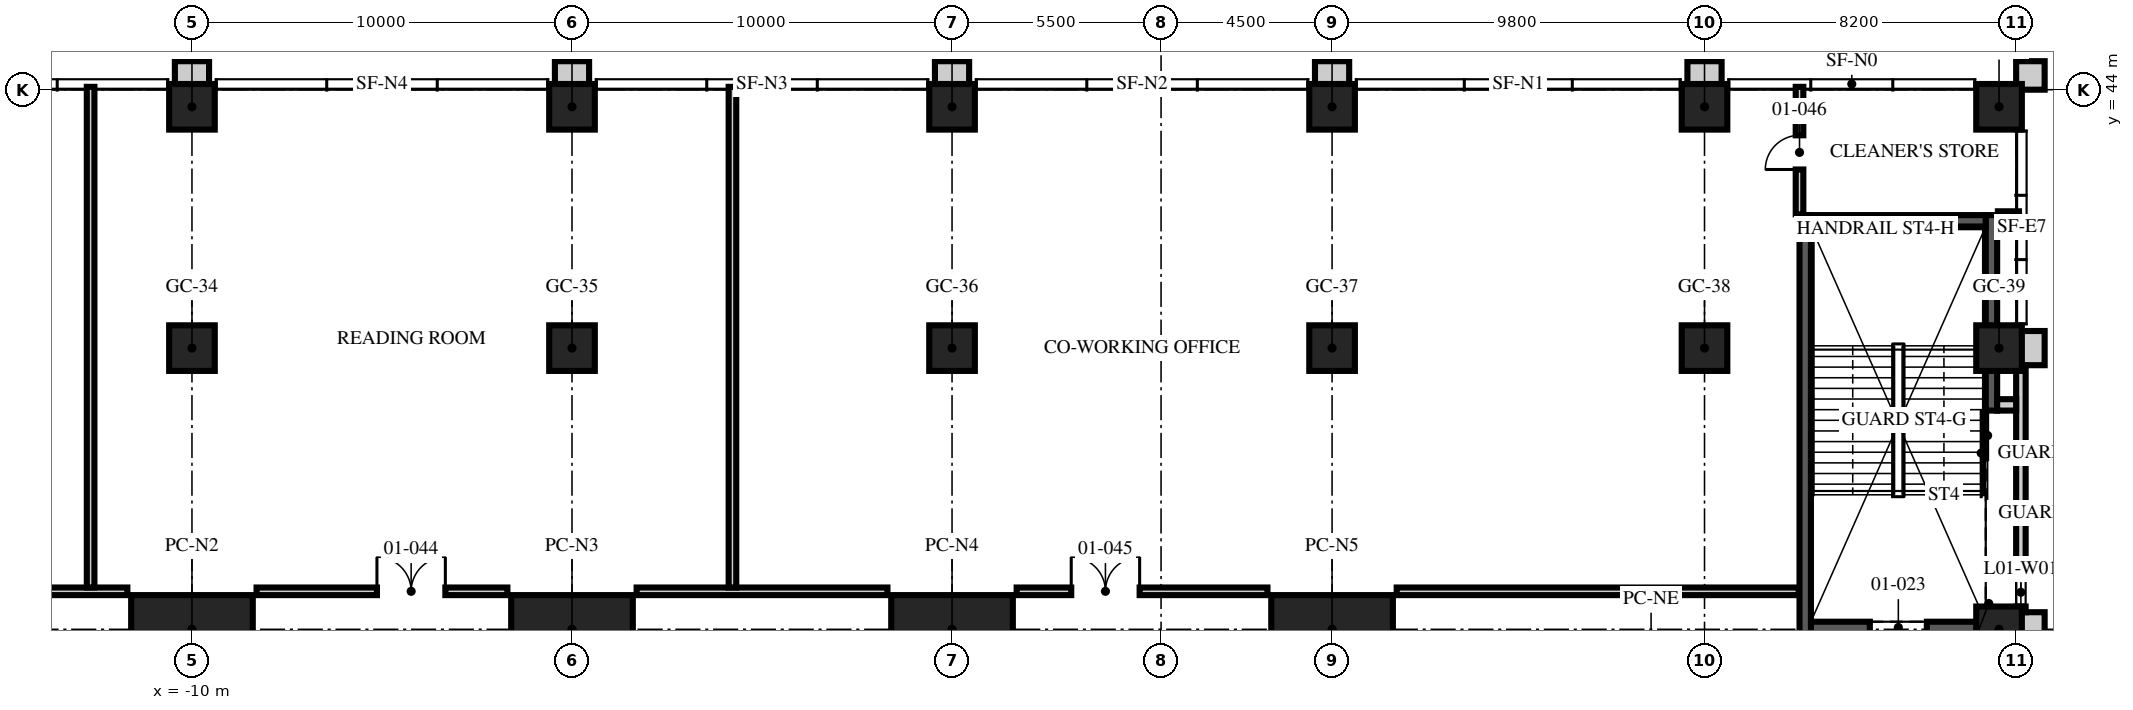
"""IFC4 building model, lengths in metres.
Left out: names, types, materials, properties, quantities, classifications, styles, units other than length and angle.
Written with IfcOpenShell. Run it as: python <this file> out.ifc"""

import sys

from ifc_helpers import new_model, si_unit, direction, frame, frame_2d, origin, origin_2d, place, context, subcontext, project, spatial, rectangle, hollow_rectangle, extrude, element, fill, save


model = new_model("IFC4")
c1 = context("Model", 3, precision=1e-05, world=origin(), true_north=direction((0.0, 1.0)))
c2 = subcontext(c1, "Body", "Model", "MODEL_VIEW")
j1 = project(units=[si_unit("LENGTHUNIT", "METRE"), si_unit("PLANEANGLEUNIT", "RADIAN")], contexts=[c1])
p1 = place(None, origin())
s1 = spatial("IfcSite", under=j1, at=p1, CompositionType="ELEMENT")
p2 = place(p1, origin())
s2 = spatial("IfcBuilding", under=s1, at=p2, CompositionType="ELEMENT")
p3 = place(p2, frame((0.0, 0.0, 6.0)))
s3 = spatial("IfcBuildingStorey", under=s2, at=p3, CompositionType="ELEMENT", Elevation=6.0)
for number, where, z_axis, x_axis in (
    (1, (-10.0, 29.8, 0.0), (0.0, 0.0, 1.0), (1.0, 0.0, 0.0)),
    (2, (0.0, 29.8, 0.0), (0.0, 0.0, 1.0), (1.0, 0.0, 0.0)),
    (3, (10.0, 29.8, 0.0), (0.0, 0.0, 1.0), (1.0, 0.0, 0.0)),
    (4, (20.0, 29.8, 0.0), (0.0, 0.0, 1.0), (1.0, 0.0, 0.0)),
):
    element("IfcColumn", number, at=place(p3, frame(where, z_axis=z_axis, x_axis=x_axis)), inside=s3, PredefinedType="COLUMN", context=c2, shape_type="SweptSolid", body=[
        extrude(hollow_rectangle(XDim=3.2, YDim=1.8, WallThickness=0.2, at=origin_2d()), origin(), (0.0, 0.0, 1.0), 5.0),
    ])
for number, where, z_axis, x_axis in (
    (5, (37.55, 29.8, 0.0), (0.0, 0.0, 1.0), (1.0, 0.0, 0.0)),
    (6, (-10.0, 37.2, 0.0), (0.0, 0.0, 1.0), (1.0, 0.0, 0.0)),
    (7, (0.0, 37.2, 0.0), (0.0, 0.0, 1.0), (1.0, 0.0, 0.0)),
    (8, (10.0, 37.2, 0.0), (0.0, 0.0, 1.0), (1.0, 0.0, 0.0)),
    (9, (20.0, 37.2, 0.0), (0.0, 0.0, 1.0), (1.0, 0.0, 0.0)),
    (10, (29.8, 37.2, 0.0), (0.0, 0.0, 1.0), (1.0, 0.0, 0.0)),
    (11, (37.55, 37.2, 0.0), (0.0, 0.0, 1.0), (1.0, 0.0, 0.0)),
    (12, (-10.0, 43.55, 0.0), (0.0, 0.0, 1.0), (1.0, 0.0, 0.0)),
    (13, (0.0, 43.55, 0.0), (0.0, 0.0, 1.0), (1.0, 0.0, 0.0)),
    (14, (10.0, 43.55, 0.0), (0.0, 0.0, 1.0), (1.0, 0.0, 0.0)),
    (15, (20.0, 43.55, 0.0), (0.0, 0.0, 1.0), (1.0, 0.0, 0.0)),
    (16, (29.8, 43.55, 0.0), (0.0, 0.0, 1.0), (1.0, 0.0, 0.0)),
    (17, (37.55, 43.55, 0.0), (0.0, 0.0, 1.0), (1.0, 0.0, 0.0)),
):
    element("IfcColumn", number, at=place(p3, frame(where, z_axis=z_axis, x_axis=x_axis)), inside=s3, PredefinedType="COLUMN", context=c2, shape_type="SweptSolid", body=[
        extrude(rectangle(XDim=1.2, YDim=1.2, at=origin_2d()), origin(), (0.0, 0.0, 1.0), 5.0),
    ])
for number, where, z_axis, x_axis in (
    (18, (38.375, 29.35, 0.0), (0.0, 0.0, 1.0), (0.0, 1.0, 0.0)),
    (19, (38.375, 36.75, 0.0), (0.0, 0.0, 1.0), (0.0, 1.0, 0.0)),
):
    element("IfcWall", number, at=place(p3, frame(where, z_axis=z_axis, x_axis=x_axis)), inside=s3, PredefinedType="SOLIDWALL", context=c2, shape_type="SweptSolid", body=[
        extrude(rectangle(XDim=0.9, YDim=0.75, at=frame_2d((0.45, 0.0))), origin(), (0.0, 0.0, 1.0), 5.0),
    ])
p4 = place(p3, frame((38.375, 44.0, 0.0), z_axis=(0.0, 0.0, 1.0), x_axis=(0.0, 1.0, 0.0)))
e20 = element("IfcWall", 20, at=p4, inside=s3, PredefinedType="SOLIDWALL", context=c2, shape_type="SweptSolid", body=[
    extrude(rectangle(XDim=0.75, YDim=0.75, at=frame_2d((0.375, 0.0))), origin(), (0.0, 0.0, 1.0), 5.0),
])
p5 = place(p3, frame((38.125, 30.25, 0.0), z_axis=(0.0, 0.0, 1.0), x_axis=(0.0, 1.0, 0.0)))
e21 = element("IfcWall", 21, at=p5, inside=s3, PredefinedType="SOLIDWALL", context=c2, shape_type="SweptSolid", body=[
    extrude(rectangle(XDim=6.5, YDim=0.25, at=frame_2d((3.25, 0.0))), origin(), (0.0, 0.0, 1.0), 5.0),
])
p6 = place(p5, frame((0.15, 0.0, 1.2)))
e22 = element("IfcOpeningElement", 22, at=p6, cuts=e21, PredefinedType="OPENING", context=c2, shape_type="SweptSolid", body=[
    extrude(rectangle(XDim=0.75, YDim=1.7, at=frame_2d((0.375, 0.85))), frame((0.0, 0.135, 0.0), z_axis=(0.0, -1.0, 0.0), x_axis=(1.0, 0.0, 0.0)), (0.0, 0.0, 1.0), 0.27),
])
for number, where, z_axis, x_axis in (
    (23, (30.25, 44.375, 0.0), (0.0, 0.0, 1.0), (-1.0, 0.0, 0.0)),
    (24, (20.45, 44.375, 0.0), (0.0, 0.0, 1.0), (-1.0, 0.0, 0.0)),
    (25, (10.45, 44.375, 0.0), (0.0, 0.0, 1.0), (-1.0, 0.0, 0.0)),
    (26, (0.45, 44.375, 0.0), (0.0, 0.0, 1.0), (-1.0, 0.0, 0.0)),
    (27, (-9.55, 44.375, 0.0), (0.0, 0.0, 1.0), (-1.0, 0.0, 0.0)),
):
    element("IfcWall", number, at=place(p3, frame(where, z_axis=z_axis, x_axis=x_axis)), inside=s3, PredefinedType="SOLIDWALL", context=c2, shape_type="SweptSolid", body=[
        extrude(rectangle(XDim=0.9, YDim=0.75, at=frame_2d((0.45, 0.0))), origin(), (0.0, 0.0, 1.0), 5.0),
    ])
p7 = place(p3, frame((37.35, 35.556, 0.0), z_axis=(0.0, 0.0, 1.0), x_axis=(0.0, 1.0, 0.0)))
e28 = element("IfcWall", 28, at=p7, inside=s3, PredefinedType="SOLIDWALL", context=c2, shape_type="SweptSolid", body=[
    extrude(rectangle(XDim=5.144, YDim=0.3, at=frame_2d((2.572, 0.0))), origin(), (0.0, 0.0, 1.0), 4.7),
])
p8 = place(p3, frame((38.0, 35.706, 0.0), z_axis=(0.0, 0.0, 1.0), x_axis=(-1.0, 0.0, 0.0)))
e29 = element("IfcWall", 29, at=p8, inside=s3, PredefinedType="PARTITIONING", context=c2, shape_type="SweptSolid", body=[
    extrude(rectangle(XDim=0.5, YDim=0.3, at=frame_2d((0.25, 0.0))), origin(), (0.0, 0.0, 1.0), 3.27),
])
p9 = place(p3, frame((38.0, 29.85, 0.0), z_axis=(0.0, 0.0, 1.0), x_axis=(-1.0, 0.0, 0.0)))
e30 = element("IfcWall", 30, at=p9, inside=s3, PredefinedType="SOLIDWALL", context=c2, shape_type="SweptSolid", body=[
    extrude(rectangle(XDim=5.4, YDim=0.3, at=frame_2d((2.7, 0.0))), origin(), (0.0, 0.0, 1.0), 4.7),
])
p10 = place(p9, frame((2.35, 0.0, 0.0)))
e31 = element("IfcOpeningElement", 31, at=p10, cuts=e30, PredefinedType="OPENING", context=c2, shape_type="SweptSolid", body=[
    extrude(rectangle(XDim=1.5, YDim=2.1, at=frame_2d((0.75, 1.05))), frame((0.0, 0.16, 0.0), z_axis=(0.0, -1.0, 0.0), x_axis=(1.0, 0.0, 0.0)), (0.0, 0.0, 1.0), 0.32),
])
p11 = place(p3, frame((32.45, 29.7, 0.0), z_axis=(0.0, 0.0, 1.0), x_axis=(0.0, 1.0, 0.0)))
e32 = element("IfcWall", 32, at=p11, inside=s3, PredefinedType="SOLIDWALL", context=c2, shape_type="SweptSolid", body=[
    extrude(rectangle(XDim=11.0, YDim=0.3, at=frame_2d((5.5, 0.0))), origin(), (0.0, 0.0, 1.0), 4.7),
])
p12 = place(p3, frame((37.2, 40.55, 0.0), z_axis=(0.0, 0.0, 1.0), x_axis=(-1.0, 0.0, 0.0)))
e33 = element("IfcWall", 33, at=p12, inside=s3, PredefinedType="SOLIDWALL", context=c2, shape_type="SweptSolid", body=[
    extrude(rectangle(XDim=4.6, YDim=0.3, at=frame_2d((2.3, 0.0))), origin(), (0.0, 0.0, 1.0), 4.7),
])
p13 = place(p3, frame((-18.3, 30.8, 0.0), z_axis=(0.0, 0.0, 1.0), x_axis=(1.0, 0.0, 0.0)))
e34 = element("IfcWall", 34, at=p13, inside=s3, PredefinedType="SOLIDWALL", context=c2, shape_type="SweptSolid", body=[
    extrude(rectangle(XDim=6.6, YDim=0.2, at=frame_2d((3.3, 0.0))), origin(), (0.0, 0.0, 1.0), 4.7),
])
p14 = place(p3, frame((-8.3, 30.8, 0.0), z_axis=(0.0, 0.0, 1.0), x_axis=(1.0, 0.0, 0.0)))
e35 = element("IfcWall", 35, at=p14, inside=s3, PredefinedType="SOLIDWALL", context=c2, shape_type="SweptSolid", body=[
    extrude(rectangle(XDim=6.6, YDim=0.2, at=frame_2d((3.3, 0.0))), origin(), (0.0, 0.0, 1.0), 4.7),
])
p15 = place(p14, frame((3.167, 0.0, 0.0)))
e36 = element("IfcOpeningElement", 36, at=p15, cuts=e35, PredefinedType="OPENING", context=c2, shape_type="SweptSolid", body=[
    extrude(rectangle(XDim=1.8, YDim=2.4, at=frame_2d((0.9, 1.2))), frame((0.0, 0.11, 0.0), z_axis=(0.0, -1.0, 0.0), x_axis=(1.0, 0.0, 0.0)), (0.0, 0.0, 1.0), 0.22),
])
p16 = place(p3, frame((1.7, 30.8, 0.0), z_axis=(0.0, 0.0, 1.0), x_axis=(1.0, 0.0, 0.0)))
e37 = element("IfcWall", 37, at=p16, inside=s3, PredefinedType="SOLIDWALL", context=c2, shape_type="SweptSolid", body=[
    extrude(rectangle(XDim=6.6, YDim=0.2, at=frame_2d((3.3, 0.0))), origin(), (0.0, 0.0, 1.0), 4.7),
])
p17 = place(p3, frame((11.7, 30.8, 0.0), z_axis=(0.0, 0.0, 1.0), x_axis=(1.0, 0.0, 0.0)))
e38 = element("IfcWall", 38, at=p17, inside=s3, PredefinedType="SOLIDWALL", context=c2, shape_type="SweptSolid", body=[
    extrude(rectangle(XDim=6.6, YDim=0.2, at=frame_2d((3.3, 0.0))), origin(), (0.0, 0.0, 1.0), 4.7),
])
p18 = place(p17, frame((1.436, 0.0, 0.0)))
e39 = element("IfcOpeningElement", 39, at=p18, cuts=e38, PredefinedType="OPENING", context=c2, shape_type="SweptSolid", body=[
    extrude(rectangle(XDim=1.8, YDim=2.4, at=frame_2d((0.9, 1.2))), frame((0.0, 0.11, 0.0), z_axis=(0.0, -1.0, 0.0), x_axis=(1.0, 0.0, 0.0)), (0.0, 0.0, 1.0), 0.22),
])
p19 = place(p3, frame((21.7, 30.8, 0.0), z_axis=(0.0, 0.0, 1.0), x_axis=(1.0, 0.0, 0.0)))
e40 = element("IfcWall", 40, at=p19, inside=s3, PredefinedType="SOLIDWALL", context=c2, shape_type="SweptSolid", body=[
    extrude(rectangle(XDim=10.58, YDim=0.2, at=frame_2d((5.29, 0.0))), origin(), (0.0, 0.0, 1.0), 4.7),
])
for number, where, z_axis, x_axis in (
    (41, (-12.667, 30.9, 0.0), (0.0, 0.0, 1.0), (0.0, 1.0, 0.0)),
    (42, (4.222, 30.9, 0.0), (0.0, 0.0, 1.0), (0.0, 1.0, 0.0)),
):
    element("IfcWall", number, at=place(p3, frame(where, z_axis=z_axis, x_axis=x_axis)), inside=s3, PredefinedType="SOLIDWALL", context=c2, shape_type="SweptSolid", body=[
        extrude(rectangle(XDim=13.175, YDim=0.2, at=frame_2d((6.587, 0.0))), origin(), (0.0, 0.0, 1.0), 3.7),
    ])
p20 = place(p3, frame((37.52, 40.7, 0.0), z_axis=(0.0, 0.0, 1.0), x_axis=(1.0, 0.0, 0.0)))
e43 = element("IfcWall", 43, at=p20, inside=s3, PredefinedType="SOLIDWALL", context=c2, shape_type="SweptSolid", body=[
    extrude(rectangle(XDim=0.555, YDim=0.2, at=frame_2d((0.277, 0.0))), origin(), (0.0, 0.0, 1.0), 3.27),
])
p21 = place(p3, frame((32.3, 40.72, 0.0), z_axis=(0.0, 0.0, 1.0), x_axis=(0.0, 1.0, 0.0)))
e44 = element("IfcWall", 44, at=p21, inside=s3, PredefinedType="SOLIDWALL", context=c2, shape_type="SweptSolid", body=[
    extrude(rectangle(XDim=3.355, YDim=0.2, at=frame_2d((1.677, 0.0))), origin(), (0.0, 0.0, 1.0), 3.7),
])
p22 = place(p21, frame((1.18, 0.0, 0.0)))
e45 = element("IfcOpeningElement", 45, at=p22, cuts=e44, PredefinedType="OPENING", context=c2, shape_type="SweptSolid", body=[
    extrude(rectangle(XDim=0.9, YDim=2.1, at=frame_2d((0.45, 1.05))), frame((0.0, 0.11, 0.0), z_axis=(0.0, -1.0, 0.0), x_axis=(1.0, 0.0, 0.0)), (0.0, 0.0, 1.0), 0.22),
])
p23 = place(p6, origin())
e46 = element("IfcWindow", 46, at=p23, inside=s3, PartitioningType="SINGLE_PANEL", PredefinedType="WINDOW", context=c2, shape_type="SweptSolid", body=[
    extrude(rectangle(XDim=0.75, YDim=1.7, at=frame_2d((0.375, 0.85))), frame((0.0, 0.03, 0.0), z_axis=(0.0, -1.0, 0.0), x_axis=(1.0, 0.0, 0.0)), (0.0, 0.0, 1.0), 0.06),
])
fill(e22, e46)
p24 = place(p10, origin())
e47 = element("IfcDoor", 47, at=p24, inside=s3, OperationType="DOUBLE_DOOR_SINGLE_SWING", PredefinedType="DOOR", context=c2, shape_type="SweptSolid", body=[
    extrude(rectangle(XDim=1.5, YDim=2.1, at=frame_2d((0.75, 1.05))), frame((0.0, 0.025, 0.0), z_axis=(0.0, -1.0, 0.0), x_axis=(1.0, 0.0, 0.0)), (0.0, 0.0, 1.0), 0.05),
])
fill(e31, e47)
p25 = place(p15, origin())
e48 = element("IfcDoor", 48, at=p25, inside=s3, OperationType="DOUBLE_DOOR_SINGLE_SWING", PredefinedType="DOOR", context=c2, shape_type="SweptSolid", body=[
    extrude(rectangle(XDim=1.8, YDim=2.4, at=frame_2d((0.9, 1.2))), frame((0.0, 0.025, 0.0), z_axis=(0.0, -1.0, 0.0), x_axis=(1.0, 0.0, 0.0)), (0.0, 0.0, 1.0), 0.05),
])
fill(e36, e48)
p26 = place(p18, origin())
e49 = element("IfcDoor", 49, at=p26, inside=s3, OperationType="DOUBLE_DOOR_SINGLE_SWING", PredefinedType="DOOR", context=c2, shape_type="SweptSolid", body=[
    extrude(rectangle(XDim=1.8, YDim=2.4, at=frame_2d((0.9, 1.2))), frame((0.0, 0.025, 0.0), z_axis=(0.0, -1.0, 0.0), x_axis=(1.0, 0.0, 0.0)), (0.0, 0.0, 1.0), 0.05),
])
fill(e39, e49)
p27 = place(p22, origin())
e50 = element("IfcDoor", 50, at=p27, inside=s3, OperationType="SINGLE_SWING_LEFT", PredefinedType="DOOR", context=c2, shape_type="SweptSolid", body=[
    extrude(rectangle(XDim=0.9, YDim=2.1, at=frame_2d((0.45, 1.05))), frame((0.0, 0.025, 0.0), z_axis=(0.0, -1.0, 0.0), x_axis=(1.0, 0.0, 0.0)), (0.0, 0.0, 1.0), 0.05),
])
fill(e45, e50)
save(model, sys.argv[1])
